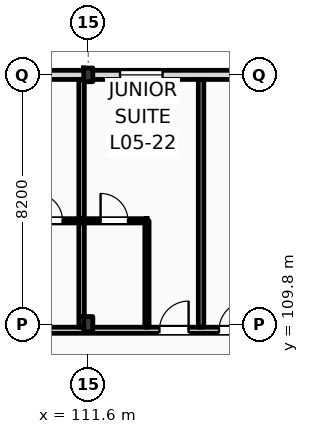
"""IFC4 building model, lengths in metres.
Left out: names, types, materials, properties, quantities, classifications, styles, units other than length and angle.
Written with IfcOpenShell. Run it as: python <this file> out.ifc"""

import sys

from ifc_helpers import new_model, si_unit, direction, frame, frame_2d, origin, origin_2d, place, context, subcontext, project, spatial, rectangle, i_section, extrude, element, fill, save


model = new_model("IFC4")
c1 = context("Model", 3, precision=1e-05, world=origin(), true_north=direction((0.0, 1.0)))
c2 = subcontext(c1, "Body", "Model", "MODEL_VIEW")
j1 = project(units=[si_unit("LENGTHUNIT", "METRE"), si_unit("PLANEANGLEUNIT", "RADIAN")], contexts=[c1])
p1 = place(None, origin())
s1 = spatial("IfcSite", under=j1, at=p1, CompositionType="ELEMENT")
p2 = place(p1, origin())
s2 = spatial("IfcBuilding", under=s1, at=p2, CompositionType="ELEMENT")
p3 = place(p2, frame((0.0, 0.0, 24.6)))
s3 = spatial("IfcBuildingStorey", under=s2, at=p3, CompositionType="ELEMENT", Elevation=24.6)
p4 = place(p3, frame((111.6, 109.8, 0.0), z_axis=(0.0, 0.0, 1.0), x_axis=(1.0, 0.0, 0.0)))
e1 = element("IfcColumn", 1, at=p4, inside=s3, PredefinedType="COLUMN", context=c2, shape_type="SweptSolid", body=[
    extrude(i_section(OverallWidth=0.3, OverallDepth=0.5, WebThickness=0.014, FlangeThickness=0.028, FilletRadius=0.027, at=origin_2d()), origin(), (0.0, 0.0, 1.0), 3.6),
])
p5 = place(p3, frame((111.6, 118.0, 0.0), z_axis=(0.0, 0.0, 1.0), x_axis=(1.0, 0.0, 0.0)))
e2 = element("IfcColumn", 2, at=p5, inside=s3, PredefinedType="COLUMN", context=c2, shape_type="SweptSolid", body=[
    extrude(i_section(OverallWidth=0.3, OverallDepth=0.45, WebThickness=0.014, FlangeThickness=0.026, FilletRadius=0.027, at=origin_2d()), origin(), (0.0, 0.0, 1.0), 3.6),
])
p6 = place(p3, frame((22.5, 118.0, 0.0), z_axis=(0.0, 0.0, 1.0), x_axis=(1.0, 0.0, 0.0)))
e3 = element("IfcWall", 3, at=p6, inside=s3, PredefinedType="STANDARD", context=c2, shape_type="SweptSolid", body=[
    extrude(rectangle(XDim=97.5, YDim=0.3, at=frame_2d((48.75, 0.0))), origin(), (0.0, 0.0, 1.0), 2.78),
])
p7 = place(p6, frame((0.91, 0.0, 0.9)))
e4 = element("IfcOpeningElement", 4, at=p7, cuts=e3, PredefinedType="OPENING", context=c2, shape_type="SweptSolid", body=[
    extrude(rectangle(XDim=0.9, YDim=1.7, at=frame_2d((0.45, 0.85))), frame((0.0, 0.16, 0.0), z_axis=(0.0, -1.0, 0.0), x_axis=(1.0, 0.0, 0.0)), (0.0, 0.0, 1.0), 0.32),
])
p8 = place(p6, frame((6.275, 0.0, 0.0)))
e5 = element("IfcOpeningElement", 5, at=p8, cuts=e3, PredefinedType="OPENING", context=c2, shape_type="SweptSolid", body=[
    extrude(rectangle(XDim=1.2, YDim=2.25, at=frame_2d((0.6, 1.125))), frame((0.0, 0.16, 0.0), z_axis=(0.0, -1.0, 0.0), x_axis=(1.0, 0.0, 0.0)), (0.0, 0.0, 1.0), 0.32),
])
p9 = place(p6, frame((11.42, 0.0, 0.9)))
e6 = element("IfcOpeningElement", 6, at=p9, cuts=e3, PredefinedType="OPENING", context=c2, shape_type="SweptSolid", body=[
    extrude(rectangle(XDim=1.35, YDim=1.7, at=frame_2d((0.675, 0.85))), frame((0.0, 0.16, 0.0), z_axis=(0.0, -1.0, 0.0), x_axis=(1.0, 0.0, 0.0)), (0.0, 0.0, 1.0), 0.32),
])
p10 = place(p6, frame((14.345, 0.0, 0.9)))
e7 = element("IfcOpeningElement", 7, at=p10, cuts=e3, PredefinedType="OPENING", context=c2, shape_type="SweptSolid", body=[
    extrude(rectangle(XDim=1.8, YDim=1.7, at=frame_2d((0.9, 0.85))), frame((0.0, 0.16, 0.0), z_axis=(0.0, -1.0, 0.0), x_axis=(1.0, 0.0, 0.0)), (0.0, 0.0, 1.0), 0.32),
])
p11 = place(p6, frame((19.27, 0.0, 0.9)))
e8 = element("IfcOpeningElement", 8, at=p11, cuts=e3, PredefinedType="OPENING", context=c2, shape_type="SweptSolid", body=[
    extrude(rectangle(XDim=1.95, YDim=1.7, at=frame_2d((0.975, 0.85))), frame((0.0, 0.16, 0.0), z_axis=(0.0, -1.0, 0.0), x_axis=(1.0, 0.0, 0.0)), (0.0, 0.0, 1.0), 0.32),
])
p12 = place(p6, frame((22.97, 0.0, 0.0)))
e9 = element("IfcOpeningElement", 9, at=p12, cuts=e3, PredefinedType="OPENING", context=c2, shape_type="SweptSolid", body=[
    extrude(rectangle(XDim=1.2, YDim=2.25, at=frame_2d((0.6, 1.125))), frame((0.0, 0.16, 0.0), z_axis=(0.0, -1.0, 0.0), x_axis=(1.0, 0.0, 0.0)), (0.0, 0.0, 1.0), 0.32),
])
p13 = place(p6, frame((26.92, 0.0, 0.9)))
e10 = element("IfcOpeningElement", 10, at=p13, cuts=e3, PredefinedType="OPENING", context=c2, shape_type="SweptSolid", body=[
    extrude(rectangle(XDim=2.25, YDim=1.7, at=frame_2d((1.125, 0.85))), frame((0.0, 0.16, 0.0), z_axis=(0.0, -1.0, 0.0), x_axis=(1.0, 0.0, 0.0)), (0.0, 0.0, 1.0), 0.32),
])
p14 = place(p6, frame((30.645, 0.0, 0.9)))
e11 = element("IfcOpeningElement", 11, at=p14, cuts=e3, PredefinedType="OPENING", context=c2, shape_type="SweptSolid", body=[
    extrude(rectangle(XDim=2.4, YDim=1.7, at=frame_2d((1.2, 0.85))), frame((0.0, 0.16, 0.0), z_axis=(0.0, -1.0, 0.0), x_axis=(1.0, 0.0, 0.0)), (0.0, 0.0, 1.0), 0.32),
])
p15 = place(p6, frame((36.71, 0.0, 0.0)))
e12 = element("IfcOpeningElement", 12, at=p15, cuts=e3, PredefinedType="OPENING", context=c2, shape_type="SweptSolid", body=[
    extrude(rectangle(XDim=1.2, YDim=2.25, at=frame_2d((0.6, 1.125))), frame((0.0, 0.16, 0.0), z_axis=(0.0, -1.0, 0.0), x_axis=(1.0, 0.0, 0.0)), (0.0, 0.0, 1.0), 0.32),
])
p16 = place(p6, frame((39.17, 0.0, 0.0)))
e13 = element("IfcOpeningElement", 13, at=p16, cuts=e3, PredefinedType="OPENING", context=c2, shape_type="SweptSolid", body=[
    extrude(rectangle(XDim=1.2, YDim=2.25, at=frame_2d((0.6, 1.125))), frame((0.0, 0.16, 0.0), z_axis=(0.0, -1.0, 0.0), x_axis=(1.0, 0.0, 0.0)), (0.0, 0.0, 1.0), 0.32),
])
p17 = place(p6, frame((43.22, 0.0, 0.9)))
e14 = element("IfcOpeningElement", 14, at=p17, cuts=e3, PredefinedType="OPENING", context=c2, shape_type="SweptSolid", body=[
    extrude(rectangle(XDim=2.85, YDim=1.7, at=frame_2d((1.425, 0.85))), frame((0.0, 0.16, 0.0), z_axis=(0.0, -1.0, 0.0), x_axis=(1.0, 0.0, 0.0)), (0.0, 0.0, 1.0), 0.32),
])
p18 = place(p6, frame((47.29, 0.0, 0.9)))
e15 = element("IfcOpeningElement", 15, at=p18, cuts=e3, PredefinedType="OPENING", context=c2, shape_type="SweptSolid", body=[
    extrude(rectangle(XDim=1.35, YDim=1.7, at=frame_2d((0.675, 0.85))), frame((0.0, 0.16, 0.0), z_axis=(0.0, -1.0, 0.0), x_axis=(1.0, 0.0, 0.0)), (0.0, 0.0, 1.0), 0.32),
])
p19 = place(p6, frame((52.91, 0.0, 0.0)))
e16 = element("IfcOpeningElement", 16, at=p19, cuts=e3, PredefinedType="OPENING", context=c2, shape_type="SweptSolid", body=[
    extrude(rectangle(XDim=1.2, YDim=2.25, at=frame_2d((0.6, 1.125))), frame((0.0, 0.16, 0.0), z_axis=(0.0, -1.0, 0.0), x_axis=(1.0, 0.0, 0.0)), (0.0, 0.0, 1.0), 0.32),
])
p20 = place(p6, frame((55.69, 0.0, 0.9)))
e17 = element("IfcOpeningElement", 17, at=p20, cuts=e3, PredefinedType="OPENING", context=c2, shape_type="SweptSolid", body=[
    extrude(rectangle(XDim=0.9, YDim=1.7, at=frame_2d((0.45, 0.85))), frame((0.0, 0.16, 0.0), z_axis=(0.0, -1.0, 0.0), x_axis=(1.0, 0.0, 0.0)), (0.0, 0.0, 1.0), 0.32),
])
p21 = place(p6, frame((59.82, 0.0, 0.9)))
e18 = element("IfcOpeningElement", 18, at=p21, cuts=e3, PredefinedType="OPENING", context=c2, shape_type="SweptSolid", body=[
    extrude(rectangle(XDim=3.25, YDim=1.7, at=frame_2d((1.625, 0.85))), frame((0.0, 0.16, 0.0), z_axis=(0.0, -1.0, 0.0), x_axis=(1.0, 0.0, 0.0)), (0.0, 0.0, 1.0), 0.32),
])
p22 = place(p6, frame((65.89, 0.0, 0.9)))
e19 = element("IfcOpeningElement", 19, at=p22, cuts=e3, PredefinedType="OPENING", context=c2, shape_type="SweptSolid", body=[
    extrude(rectangle(XDim=1.1, YDim=1.7, at=frame_2d((0.55, 0.85))), frame((0.0, 0.16, 0.0), z_axis=(0.0, -1.0, 0.0), x_axis=(1.0, 0.0, 0.0)), (0.0, 0.0, 1.0), 0.32),
])
p23 = place(p6, frame((69.245, 0.0, 0.0)))
e20 = element("IfcOpeningElement", 20, at=p23, cuts=e3, PredefinedType="OPENING", context=c2, shape_type="SweptSolid", body=[
    extrude(rectangle(XDim=1.2, YDim=2.25, at=frame_2d((0.6, 1.125))), frame((0.0, 0.16, 0.0), z_axis=(0.0, -1.0, 0.0), x_axis=(1.0, 0.0, 0.0)), (0.0, 0.0, 1.0), 0.32),
])
p24 = place(p6, frame((73.69, 0.0, 0.9)))
e21 = element("IfcOpeningElement", 21, at=p24, cuts=e3, PredefinedType="OPENING", context=c2, shape_type="SweptSolid", body=[
    extrude(rectangle(XDim=1.8, YDim=1.7, at=frame_2d((0.9, 0.85))), frame((0.0, 0.16, 0.0), z_axis=(0.0, -1.0, 0.0), x_axis=(1.0, 0.0, 0.0)), (0.0, 0.0, 1.0), 0.32),
])
p25 = place(p6, frame((76.62, 0.0, 0.9)))
e22 = element("IfcOpeningElement", 22, at=p25, cuts=e3, PredefinedType="OPENING", context=c2, shape_type="SweptSolid", body=[
    extrude(rectangle(XDim=3.25, YDim=1.7, at=frame_2d((1.625, 0.85))), frame((0.0, 0.16, 0.0), z_axis=(0.0, -1.0, 0.0), x_axis=(1.0, 0.0, 0.0)), (0.0, 0.0, 1.0), 0.32),
])
p26 = place(p6, frame((81.895, 0.0, 0.9)))
e23 = element("IfcOpeningElement", 23, at=p26, cuts=e3, PredefinedType="OPENING", context=c2, shape_type="SweptSolid", body=[
    extrude(rectangle(XDim=1.1, YDim=1.5, at=frame_2d((0.55, 0.75))), frame((0.0, 0.16, 0.0), z_axis=(0.0, -1.0, 0.0), x_axis=(1.0, 0.0, 0.0)), (0.0, 0.0, 1.0), 0.32),
])
p27 = place(p6, frame((86.02, 0.0, 0.9)))
e24 = element("IfcOpeningElement", 24, at=p27, cuts=e3, PredefinedType="OPENING", context=c2, shape_type="SweptSolid", body=[
    extrude(rectangle(XDim=1.25, YDim=1.6, at=frame_2d((0.625, 0.8))), frame((0.0, 0.16, 0.0), z_axis=(0.0, -1.0, 0.0), x_axis=(1.0, 0.0, 0.0)), (0.0, 0.0, 1.0), 0.32),
])
p28 = place(p6, frame((90.145, 0.0, 0.9)))
e25 = element("IfcOpeningElement", 25, at=p28, cuts=e3, PredefinedType="OPENING", context=c2, shape_type="SweptSolid", body=[
    extrude(rectangle(XDim=1.4, YDim=1.7, at=frame_2d((0.7, 0.85))), frame((0.0, 0.16, 0.0), z_axis=(0.0, -1.0, 0.0), x_axis=(1.0, 0.0, 0.0)), (0.0, 0.0, 1.0), 0.32),
])
p29 = place(p6, frame((94.155, 0.0, 0.9)))
e26 = element("IfcOpeningElement", 26, at=p29, cuts=e3, PredefinedType="OPENING", context=c2, shape_type="SweptSolid", body=[
    extrude(rectangle(XDim=1.6, YDim=1.7, at=frame_2d((0.8, 0.85))), frame((0.0, 0.16, 0.0), z_axis=(0.0, -1.0, 0.0), x_axis=(1.0, 0.0, 0.0)), (0.0, 0.0, 1.0), 0.32),
])
p30 = place(p3, frame((10.65, 109.6, 0.0), z_axis=(0.0, 0.0, 1.0), x_axis=(1.0, 0.0, 0.0)))
e27 = element("IfcWall", 27, at=p30, inside=s3, PredefinedType="PARTITIONING", context=c2, shape_type="SweptSolid", body=[
    extrude(rectangle(XDim=109.21, YDim=0.2, at=frame_2d((54.605, 0.0))), origin(), (0.0, 0.0, 1.0), 2.78),
])
p31 = place(p30, frame((12.705, 0.0, 0.0)))
e28 = element("IfcOpeningElement", 28, at=p31, cuts=e27, PredefinedType="OPENING", context=c2, shape_type="SweptSolid", body=[
    extrude(rectangle(XDim=1.02, YDim=2.2, at=frame_2d((0.51, 1.1))), frame((0.0, 0.11, 0.0), z_axis=(0.0, -1.0, 0.0), x_axis=(1.0, 0.0, 0.0)), (0.0, 0.0, 1.0), 0.22),
])
p32 = place(p30, frame((19.26, 0.0, 0.0)))
e29 = element("IfcOpeningElement", 29, at=p32, cuts=e27, PredefinedType="OPENING", context=c2, shape_type="SweptSolid", body=[
    extrude(rectangle(XDim=1.02, YDim=2.2, at=frame_2d((0.51, 1.1))), frame((0.0, 0.11, 0.0), z_axis=(0.0, -1.0, 0.0), x_axis=(1.0, 0.0, 0.0)), (0.0, 0.0, 1.0), 0.22),
])
p33 = place(p30, frame((23.71, 0.0, 0.0)))
e30 = element("IfcOpeningElement", 30, at=p33, cuts=e27, PredefinedType="OPENING", context=c2, shape_type="SweptSolid", body=[
    extrude(rectangle(XDim=1.02, YDim=2.2, at=frame_2d((0.51, 1.1))), frame((0.0, 0.11, 0.0), z_axis=(0.0, -1.0, 0.0), x_axis=(1.0, 0.0, 0.0)), (0.0, 0.0, 1.0), 0.22),
])
p34 = place(p30, frame((27.66, 0.0, 0.0)))
e31 = element("IfcOpeningElement", 31, at=p34, cuts=e27, PredefinedType="OPENING", context=c2, shape_type="SweptSolid", body=[
    extrude(rectangle(XDim=1.02, YDim=2.2, at=frame_2d((0.51, 1.1))), frame((0.0, 0.11, 0.0), z_axis=(0.0, -1.0, 0.0), x_axis=(1.0, 0.0, 0.0)), (0.0, 0.0, 1.0), 0.22),
])
p35 = place(p30, frame((31.89, 0.0, 0.0)))
e32 = element("IfcOpeningElement", 32, at=p35, cuts=e27, PredefinedType="OPENING", context=c2, shape_type="SweptSolid", body=[
    extrude(rectangle(XDim=0.96, YDim=2.2, at=frame_2d((0.48, 1.1))), frame((0.0, 0.11, 0.0), z_axis=(0.0, -1.0, 0.0), x_axis=(1.0, 0.0, 0.0)), (0.0, 0.0, 1.0), 0.22),
])
p36 = place(p30, frame((33.94, 0.0, 0.0)))
e33 = element("IfcOpeningElement", 33, at=p36, cuts=e27, PredefinedType="OPENING", context=c2, shape_type="SweptSolid", body=[
    extrude(rectangle(XDim=0.96, YDim=2.2, at=frame_2d((0.48, 1.1))), frame((0.0, 0.11, 0.0), z_axis=(0.0, -1.0, 0.0), x_axis=(1.0, 0.0, 0.0)), (0.0, 0.0, 1.0), 0.22),
])
p37 = place(p30, frame((40.29, 0.0, 0.0)))
e34 = element("IfcOpeningElement", 34, at=p37, cuts=e27, PredefinedType="OPENING", context=c2, shape_type="SweptSolid", body=[
    extrude(rectangle(XDim=0.96, YDim=2.2, at=frame_2d((0.48, 1.1))), frame((0.0, 0.11, 0.0), z_axis=(0.0, -1.0, 0.0), x_axis=(1.0, 0.0, 0.0)), (0.0, 0.0, 1.0), 0.22),
])
p38 = place(p30, frame((42.34, 0.0, 0.0)))
e35 = element("IfcOpeningElement", 35, at=p38, cuts=e27, PredefinedType="OPENING", context=c2, shape_type="SweptSolid", body=[
    extrude(rectangle(XDim=0.96, YDim=2.2, at=frame_2d((0.48, 1.1))), frame((0.0, 0.11, 0.0), z_axis=(0.0, -1.0, 0.0), x_axis=(1.0, 0.0, 0.0)), (0.0, 0.0, 1.0), 0.22),
])
p39 = place(p30, frame((48.69, 0.0, 0.0)))
e36 = element("IfcOpeningElement", 36, at=p39, cuts=e27, PredefinedType="OPENING", context=c2, shape_type="SweptSolid", body=[
    extrude(rectangle(XDim=0.96, YDim=2.2, at=frame_2d((0.48, 1.1))), frame((0.0, 0.11, 0.0), z_axis=(0.0, -1.0, 0.0), x_axis=(1.0, 0.0, 0.0)), (0.0, 0.0, 1.0), 0.22),
])
p40 = place(p30, frame((50.74, 0.0, 0.0)))
e37 = element("IfcOpeningElement", 37, at=p40, cuts=e27, PredefinedType="OPENING", context=c2, shape_type="SweptSolid", body=[
    extrude(rectangle(XDim=0.96, YDim=2.2, at=frame_2d((0.48, 1.1))), frame((0.0, 0.11, 0.0), z_axis=(0.0, -1.0, 0.0), x_axis=(1.0, 0.0, 0.0)), (0.0, 0.0, 1.0), 0.22),
])
p41 = place(p30, frame((57.09, 0.0, 0.0)))
e38 = element("IfcOpeningElement", 38, at=p41, cuts=e27, PredefinedType="OPENING", context=c2, shape_type="SweptSolid", body=[
    extrude(rectangle(XDim=0.96, YDim=2.2, at=frame_2d((0.48, 1.1))), frame((0.0, 0.11, 0.0), z_axis=(0.0, -1.0, 0.0), x_axis=(1.0, 0.0, 0.0)), (0.0, 0.0, 1.0), 0.22),
])
p42 = place(p30, frame((59.14, 0.0, 0.0)))
e39 = element("IfcOpeningElement", 39, at=p42, cuts=e27, PredefinedType="OPENING", context=c2, shape_type="SweptSolid", body=[
    extrude(rectangle(XDim=0.96, YDim=2.2, at=frame_2d((0.48, 1.1))), frame((0.0, 0.11, 0.0), z_axis=(0.0, -1.0, 0.0), x_axis=(1.0, 0.0, 0.0)), (0.0, 0.0, 1.0), 0.22),
])
p43 = place(p30, frame((65.49, 0.0, 0.0)))
e40 = element("IfcOpeningElement", 40, at=p43, cuts=e27, PredefinedType="OPENING", context=c2, shape_type="SweptSolid", body=[
    extrude(rectangle(XDim=0.96, YDim=2.2, at=frame_2d((0.48, 1.1))), frame((0.0, 0.11, 0.0), z_axis=(0.0, -1.0, 0.0), x_axis=(1.0, 0.0, 0.0)), (0.0, 0.0, 1.0), 0.22),
])
p44 = place(p30, frame((67.54, 0.0, 0.0)))
e41 = element("IfcOpeningElement", 41, at=p44, cuts=e27, PredefinedType="OPENING", context=c2, shape_type="SweptSolid", body=[
    extrude(rectangle(XDim=0.96, YDim=2.2, at=frame_2d((0.48, 1.1))), frame((0.0, 0.11, 0.0), z_axis=(0.0, -1.0, 0.0), x_axis=(1.0, 0.0, 0.0)), (0.0, 0.0, 1.0), 0.22),
])
p45 = place(p30, frame((73.89, 0.0, 0.0)))
e42 = element("IfcOpeningElement", 42, at=p45, cuts=e27, PredefinedType="OPENING", context=c2, shape_type="SweptSolid", body=[
    extrude(rectangle(XDim=0.96, YDim=2.2, at=frame_2d((0.48, 1.1))), frame((0.0, 0.11, 0.0), z_axis=(0.0, -1.0, 0.0), x_axis=(1.0, 0.0, 0.0)), (0.0, 0.0, 1.0), 0.22),
])
p46 = place(p30, frame((78.09, 0.0, 0.0)))
e43 = element("IfcOpeningElement", 43, at=p46, cuts=e27, PredefinedType="OPENING", context=c2, shape_type="SweptSolid", body=[
    extrude(rectangle(XDim=0.96, YDim=2.2, at=frame_2d((0.48, 1.1))), frame((0.0, 0.11, 0.0), z_axis=(0.0, -1.0, 0.0), x_axis=(1.0, 0.0, 0.0)), (0.0, 0.0, 1.0), 0.22),
])
p47 = place(p30, frame((82.29, 0.0, 0.0)))
e44 = element("IfcOpeningElement", 44, at=p47, cuts=e27, PredefinedType="OPENING", context=c2, shape_type="SweptSolid", body=[
    extrude(rectangle(XDim=0.96, YDim=2.2, at=frame_2d((0.48, 1.1))), frame((0.0, 0.11, 0.0), z_axis=(0.0, -1.0, 0.0), x_axis=(1.0, 0.0, 0.0)), (0.0, 0.0, 1.0), 0.22),
])
p48 = place(p30, frame((86.49, 0.0, 0.0)))
e45 = element("IfcOpeningElement", 45, at=p48, cuts=e27, PredefinedType="OPENING", context=c2, shape_type="SweptSolid", body=[
    extrude(rectangle(XDim=0.96, YDim=2.2, at=frame_2d((0.48, 1.1))), frame((0.0, 0.11, 0.0), z_axis=(0.0, -1.0, 0.0), x_axis=(1.0, 0.0, 0.0)), (0.0, 0.0, 1.0), 0.22),
])
p49 = place(p30, frame((88.54, 0.0, 0.0)))
e46 = element("IfcOpeningElement", 46, at=p49, cuts=e27, PredefinedType="OPENING", context=c2, shape_type="SweptSolid", body=[
    extrude(rectangle(XDim=0.96, YDim=2.2, at=frame_2d((0.48, 1.1))), frame((0.0, 0.11, 0.0), z_axis=(0.0, -1.0, 0.0), x_axis=(1.0, 0.0, 0.0)), (0.0, 0.0, 1.0), 0.22),
])
p50 = place(p30, frame((94.89, 0.0, 0.0)))
e47 = element("IfcOpeningElement", 47, at=p50, cuts=e27, PredefinedType="OPENING", context=c2, shape_type="SweptSolid", body=[
    extrude(rectangle(XDim=0.96, YDim=2.2, at=frame_2d((0.48, 1.1))), frame((0.0, 0.11, 0.0), z_axis=(0.0, -1.0, 0.0), x_axis=(1.0, 0.0, 0.0)), (0.0, 0.0, 1.0), 0.22),
])
p51 = place(p30, frame((96.94, 0.0, 0.0)))
e48 = element("IfcOpeningElement", 48, at=p51, cuts=e27, PredefinedType="OPENING", context=c2, shape_type="SweptSolid", body=[
    extrude(rectangle(XDim=0.96, YDim=2.2, at=frame_2d((0.48, 1.1))), frame((0.0, 0.11, 0.0), z_axis=(0.0, -1.0, 0.0), x_axis=(1.0, 0.0, 0.0)), (0.0, 0.0, 1.0), 0.22),
])
p52 = place(p30, frame((103.29, 0.0, 0.0)))
e49 = element("IfcOpeningElement", 49, at=p52, cuts=e27, PredefinedType="OPENING", context=c2, shape_type="SweptSolid", body=[
    extrude(rectangle(XDim=0.96, YDim=2.2, at=frame_2d((0.48, 1.1))), frame((0.0, 0.11, 0.0), z_axis=(0.0, -1.0, 0.0), x_axis=(1.0, 0.0, 0.0)), (0.0, 0.0, 1.0), 0.22),
])
p53 = place(p30, frame((105.25, 0.0, 0.0)))
e50 = element("IfcOpeningElement", 50, at=p53, cuts=e27, PredefinedType="OPENING", context=c2, shape_type="SweptSolid", body=[
    extrude(rectangle(XDim=0.96, YDim=2.2, at=frame_2d((0.48, 1.1))), frame((0.0, 0.11, 0.0), z_axis=(0.0, -1.0, 0.0), x_axis=(1.0, 0.0, 0.0)), (0.0, 0.0, 1.0), 0.22),
])
p54 = place(p30, frame((2.716, 0.0, 0.0)))
e51 = element("IfcOpeningElement", 51, at=p54, cuts=e27, PredefinedType="OPENING", context=c2, shape_type="SweptSolid", body=[
    extrude(rectangle(XDim=1.35, YDim=2.25, at=frame_2d((0.675, 1.125))), frame((0.0, 0.11, 0.0), z_axis=(0.0, -1.0, 0.0), x_axis=(1.0, 0.0, 0.0)), (0.0, 0.0, 1.0), 0.22),
])
p55 = place(p30, frame((6.65, 0.0, 0.0)))
e52 = element("IfcOpeningElement", 52, at=p55, cuts=e27, PredefinedType="OPENING", context=c2, shape_type="SweptSolid", body=[
    extrude(rectangle(XDim=1.35, YDim=2.25, at=frame_2d((0.675, 1.125))), frame((0.0, 0.11, 0.0), z_axis=(0.0, -1.0, 0.0), x_axis=(1.0, 0.0, 0.0)), (0.0, 0.0, 1.0), 0.22),
])
p56 = place(p30, frame((10.583, 0.0, 0.0)))
e53 = element("IfcOpeningElement", 53, at=p56, cuts=e27, PredefinedType="OPENING", context=c2, shape_type="SweptSolid", body=[
    extrude(rectangle(XDim=1.35, YDim=2.25, at=frame_2d((0.675, 1.125))), frame((0.0, 0.11, 0.0), z_axis=(0.0, -1.0, 0.0), x_axis=(1.0, 0.0, 0.0)), (0.0, 0.0, 1.0), 0.22),
])
p57 = place(p3, frame((111.38, 109.7, 0.0), z_axis=(0.0, 0.0, 1.0), x_axis=(0.0, 1.0, 0.0)))
e54 = element("IfcWall", 54, at=p57, inside=s3, PredefinedType="PARTITIONING", context=c2, shape_type="SweptSolid", body=[
    extrude(rectangle(XDim=8.15, YDim=0.18, at=frame_2d((4.075, 0.0))), origin(), (0.0, 0.0, 1.0), 2.93),
])
p58 = place(p3, frame((109.23, 113.2, 0.0), z_axis=(0.0, 0.0, 1.0), x_axis=(1.0, 0.0, 0.0)))
e55 = element("IfcWall", 55, at=p58, inside=s3, PredefinedType="PARTITIONING", context=c2, shape_type="SweptSolid", body=[
    extrude(rectangle(XDim=2.15, YDim=0.14, at=frame_2d((1.075, 0.0))), origin(), (0.0, 0.0, 1.0), 3.34),
])
p59 = place(p58, frame((0.625, 0.0, 0.0)))
e56 = element("IfcOpeningElement", 56, at=p59, cuts=e55, PredefinedType="OPENING", context=c2, shape_type="SweptSolid", body=[
    extrude(rectangle(XDim=0.9, YDim=2.1, at=frame_2d((0.45, 1.05))), frame((0.0, 0.08, 0.0), z_axis=(0.0, -1.0, 0.0), x_axis=(1.0, 0.0, 0.0)), (0.0, 0.0, 1.0), 0.16),
])
p60 = place(p3, frame((115.31, 109.7, 0.0), z_axis=(0.0, 0.0, 1.0), x_axis=(0.0, 1.0, 0.0)))
e57 = element("IfcWall", 57, at=p60, inside=s3, PredefinedType="PARTITIONING", context=c2, shape_type="SweptSolid", body=[
    extrude(rectangle(XDim=8.15, YDim=0.18, at=frame_2d((4.075, 0.0))), origin(), (0.0, 0.0, 1.0), 3.34),
])
p61 = place(p3, frame((113.53, 109.7, 0.0), z_axis=(0.0, 0.0, 1.0), x_axis=(0.0, 1.0, 0.0)))
e58 = element("IfcWall", 58, at=p61, inside=s3, PredefinedType="PARTITIONING", context=c2, shape_type="SweptSolid", body=[
    extrude(rectangle(XDim=3.5, YDim=0.14, at=frame_2d((1.75, 0.0))), origin(), (0.0, 0.0, 1.0), 3.34),
])
p62 = place(p3, frame((111.38, 113.2, 0.0), z_axis=(0.0, 0.0, 1.0), x_axis=(1.0, 0.0, 0.0)))
e59 = element("IfcWall", 59, at=p62, inside=s3, PredefinedType="PARTITIONING", context=c2, shape_type="SweptSolid", body=[
    extrude(rectangle(XDim=2.15, YDim=0.14, at=frame_2d((1.075, 0.0))), origin(), (0.0, 0.0, 1.0), 3.34),
])
p63 = place(p62, frame((0.625, 0.0, 0.0)))
e60 = element("IfcOpeningElement", 60, at=p63, cuts=e59, PredefinedType="OPENING", context=c2, shape_type="SweptSolid", body=[
    extrude(rectangle(XDim=0.9, YDim=2.1, at=frame_2d((0.45, 1.05))), frame((0.0, 0.08, 0.0), z_axis=(0.0, -1.0, 0.0), x_axis=(1.0, 0.0, 0.0)), (0.0, 0.0, 1.0), 0.16),
])
p64 = place(p28, origin())
e61 = element("IfcWindow", 61, at=p64, inside=s3, PartitioningType="DOUBLE_PANEL_VERTICAL", PredefinedType="WINDOW", context=c2, shape_type="SweptSolid", body=[
    extrude(rectangle(XDim=1.4, YDim=1.7, at=frame_2d((0.7, 0.85))), frame((0.0, 0.03, 0.0), z_axis=(0.0, -1.0, 0.0), x_axis=(1.0, 0.0, 0.0)), (0.0, 0.0, 1.0), 0.06),
])
fill(e25, e61)
p65 = place(p59, origin())
e62 = element("IfcDoor", 62, at=p65, inside=s3, OperationType="SINGLE_SWING_LEFT", PredefinedType="DOOR", context=c2, shape_type="SweptSolid", body=[
    extrude(rectangle(XDim=0.9, YDim=2.1, at=frame_2d((0.45, 1.05))), frame((0.0, 0.025, 0.0), z_axis=(0.0, -1.0, 0.0), x_axis=(1.0, 0.0, 0.0)), (0.0, 0.0, 1.0), 0.05),
])
fill(e56, e62)
p66 = place(p52, origin())
e63 = element("IfcDoor", 63, at=p66, inside=s3, OperationType="SINGLE_SWING_RIGHT", PredefinedType="DOOR", context=c2, shape_type="SweptSolid", body=[
    extrude(rectangle(XDim=0.96, YDim=2.2, at=frame_2d((0.48, 1.1))), frame((0.0, 0.025, 0.0), z_axis=(0.0, -1.0, 0.0), x_axis=(1.0, 0.0, 0.0)), (0.0, 0.0, 1.0), 0.05),
])
fill(e49, e63)
p67 = place(p63, origin())
e64 = element("IfcDoor", 64, at=p67, inside=s3, OperationType="SINGLE_SWING_LEFT", PredefinedType="DOOR", context=c2, shape_type="SweptSolid", body=[
    extrude(rectangle(XDim=0.9, YDim=2.1, at=frame_2d((0.45, 1.05))), frame((0.0, 0.025, 0.0), z_axis=(0.0, -1.0, 0.0), x_axis=(1.0, 0.0, 0.0)), (0.0, 0.0, 1.0), 0.05),
])
fill(e60, e64)
p68 = place(p53, origin())
e65 = element("IfcDoor", 65, at=p68, inside=s3, OperationType="SINGLE_SWING_RIGHT", PredefinedType="DOOR", context=c2, shape_type="SweptSolid", body=[
    extrude(rectangle(XDim=0.96, YDim=2.2, at=frame_2d((0.48, 1.1))), frame((0.0, 0.025, 0.0), z_axis=(0.0, -1.0, 0.0), x_axis=(1.0, 0.0, 0.0)), (0.0, 0.0, 1.0), 0.05),
])
fill(e50, e65)
save(model, sys.argv[1])
